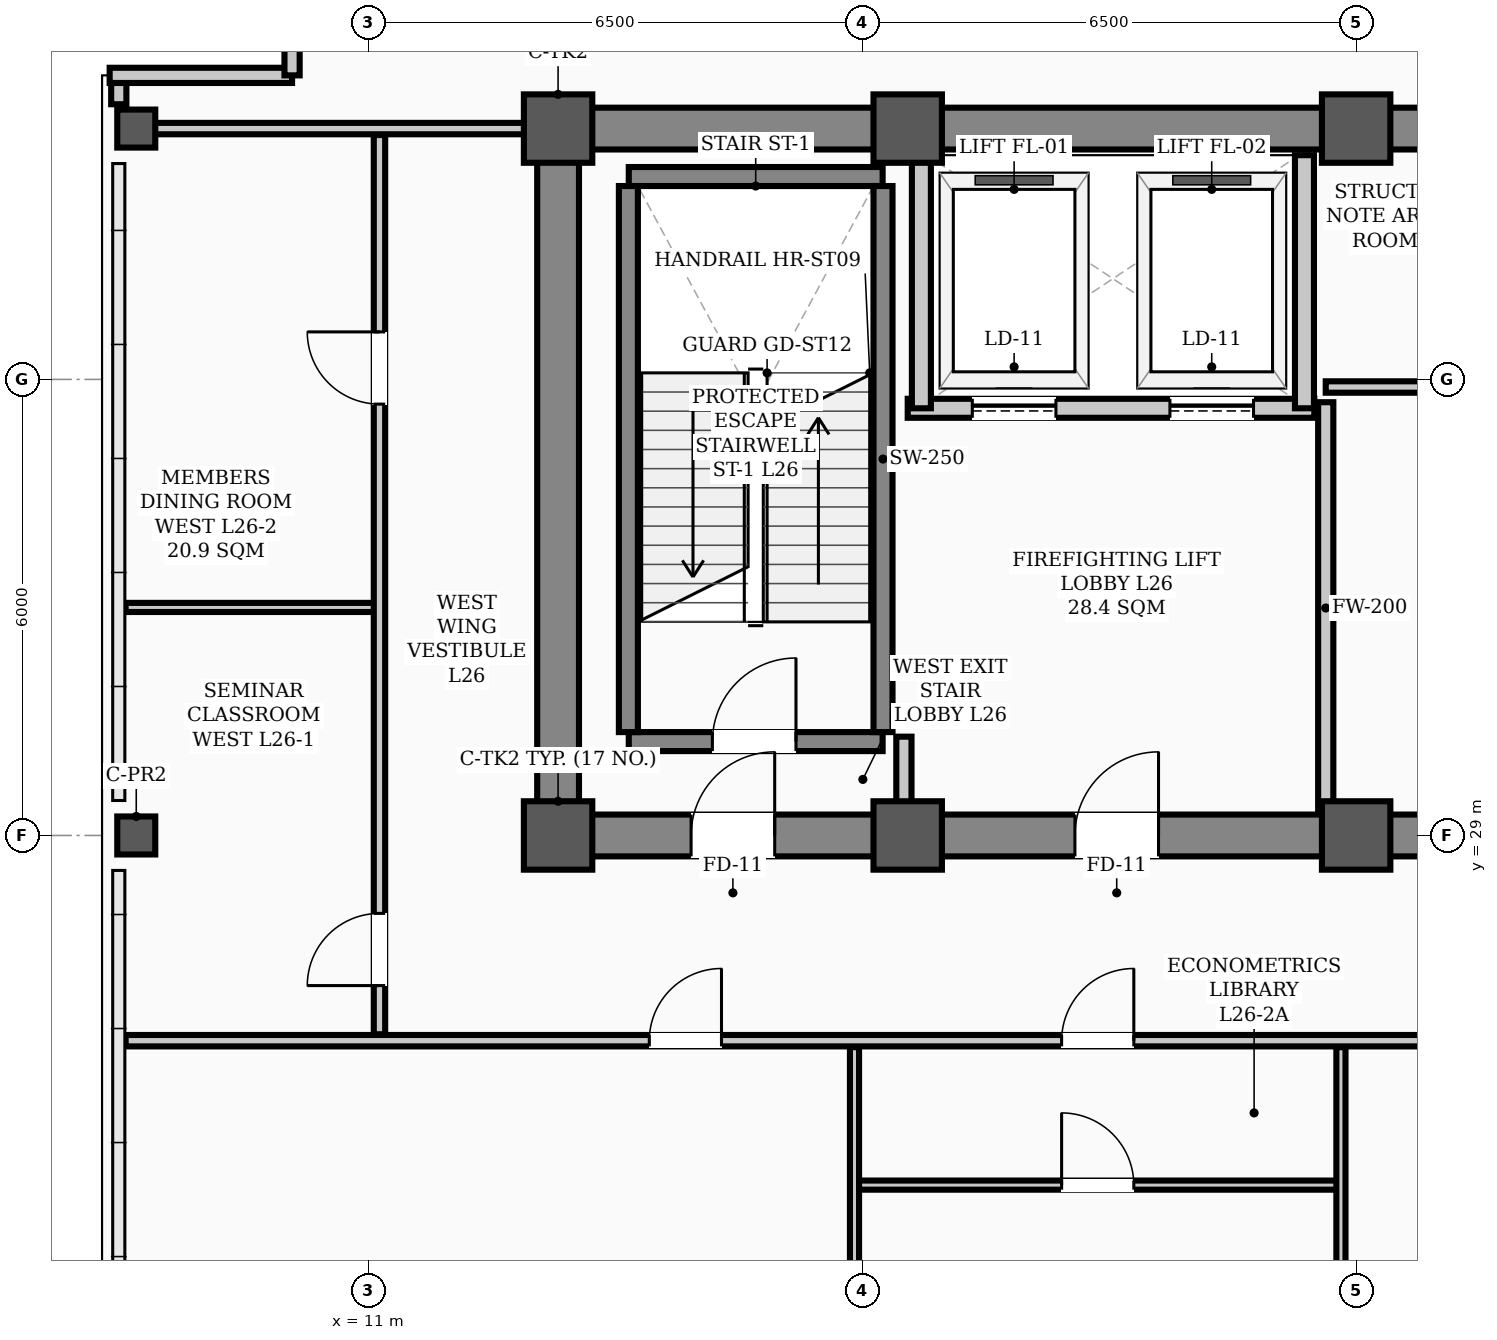
"""IFC4 building model, lengths in metres.
Left out: names, types, materials, properties, quantities, classifications, styles, units other than length and angle.
Written with IfcOpenShell. Run it as: python <this file> out.ifc"""

import sys

from ifc_helpers import new_model, si_unit, direction, frame, frame_2d, origin, origin_2d, place, context, subcontext, project, spatial, rectangle, hollow_rectangle, extrude, element, fill, save


model = new_model("IFC4")
c1 = context("Model", 3, precision=1e-05, world=origin(), true_north=direction((0.0, 1.0)))
c2 = subcontext(c1, "Body", "Model", "MODEL_VIEW")
j1 = project(units=[si_unit("LENGTHUNIT", "METRE"), si_unit("PLANEANGLEUNIT", "RADIAN")], contexts=[c1])
p1 = place(None, origin())
s1 = spatial("IfcSite", under=j1, at=p1, CompositionType="ELEMENT")
p2 = place(p1, origin())
s2 = spatial("IfcBuilding", under=s1, at=p2, CompositionType="ELEMENT")
p3 = place(p2, frame((0.0, 0.0, 106.0)))
s3 = spatial("IfcBuildingStorey", under=s2, at=p3, CompositionType="ELEMENT", Elevation=106.0)
for number, where, z_axis, x_axis in (
    (1, (13.5, 29.0, 0.0), (0.0, 0.0, 1.0), (1.0, 0.0, 0.0)),
    (2, (13.5, 38.3, 0.0), (0.0, 0.0, 1.0), (1.0, 0.0, 0.0)),
    (3, (18.1, 29.0, 0.0), (0.0, 0.0, 1.0), (1.0, 0.0, 0.0)),
    (4, (18.1, 38.3, 0.0), (0.0, 0.0, 1.0), (1.0, 0.0, 0.0)),
    (5, (24.0, 29.0, 0.0), (0.0, 0.0, 1.0), (1.0, 0.0, 0.0)),
    (6, (24.0, 38.3, 0.0), (0.0, 0.0, 1.0), (1.0, 0.0, 0.0)),
):
    element("IfcColumn", number, at=place(p3, frame(where, z_axis=z_axis, x_axis=x_axis)), inside=s3, PredefinedType="COLUMN", context=c2, shape_type="SweptSolid", body=[
        extrude(hollow_rectangle(XDim=0.9, YDim=0.9, WallThickness=0.035, InnerFilletRadius=0.017, OuterFilletRadius=0.052, at=origin_2d()), origin(), (0.0, 0.0, 1.0), 5.0),
    ])
for number, where, z_axis, x_axis in (
    (7, (7.95, 29.0, 0.0), (0.0, 0.0, 1.0), (1.0, 0.0, 0.0)),
    (8, (7.95, 38.3, 0.0), (0.0, 0.0, 1.0), (1.0, 0.0, 0.0)),
):
    element("IfcColumn", number, at=place(p3, frame(where, z_axis=z_axis, x_axis=x_axis)), inside=s3, PredefinedType="COLUMN", context=c2, shape_type="SweptSolid", body=[
        extrude(hollow_rectangle(XDim=0.5, YDim=0.5, WallThickness=0.024, InnerFilletRadius=0.012, OuterFilletRadius=0.036, at=origin_2d()), origin(), (0.0, 0.0, 1.0), 5.0),
    ])
p4 = place(p3, frame((7.72, 38.62, 0.0), z_axis=(0.0, 0.0, 1.0), x_axis=(0.0, 1.0, 0.0)))
e9 = element("IfcWall", 9, at=p4, inside=s3, PredefinedType="PARAPET", context=c2, shape_type="SweptSolid", body=[
    extrude(rectangle(XDim=0.28, YDim=0.2, at=frame_2d((0.14, 0.0))), origin(), (0.0, 0.0, 1.0), 1.2),
])
for number, where, z_axis, x_axis in (
    (10, (7.6, 39.0, 0.0), (0.0, 0.0, 1.0), (1.0, 0.0, 0.0)),
    (11, (10.0, 39.0, 0.0), (0.0, 0.0, 1.0), (0.0, 1.0, 0.0)),
):
    element("IfcWall", number, at=place(p3, frame(where, z_axis=z_axis, x_axis=x_axis)), inside=s3, PredefinedType="PARAPET", context=c2, shape_type="SweptSolid", body=[
        extrude(rectangle(XDim=2.4, YDim=0.2, at=frame_2d((1.2, 0.0))), origin(), (0.0, 0.0, 1.0), 1.2),
    ])
p5 = place(p3, frame((13.5, 29.0, 0.0), z_axis=(0.0, 0.0, 1.0), x_axis=(1.0, 0.0, 0.0)))
e12 = element("IfcWall", 12, at=p5, inside=s3, PredefinedType="SHEAR", context=c2, shape_type="SweptSolid", body=[
    extrude(rectangle(XDim=30.5, YDim=0.55, at=frame_2d((15.25, 0.0))), origin(), (0.0, 0.0, 1.0), 4.82),
])
p6 = place(p5, frame((1.75, 0.0, 0.0)))
e13 = element("IfcOpeningElement", 13, at=p6, cuts=e12, PredefinedType="OPENING", context=c2, shape_type="SweptSolid", body=[
    extrude(rectangle(XDim=1.1, YDim=2.08, at=frame_2d((0.55, 1.04))), frame((0.0, 0.285, 0.0), z_axis=(0.0, -1.0, 0.0), x_axis=(1.0, 0.0, 0.0)), (0.0, 0.0, 1.0), 0.57),
])
p7 = place(p5, frame((26.7, 0.0, 0.0)))
e14 = element("IfcOpeningElement", 14, at=p7, cuts=e12, PredefinedType="OPENING", context=c2, shape_type="SweptSolid", body=[
    extrude(rectangle(XDim=1.1, YDim=2.08, at=frame_2d((0.55, 1.04))), frame((0.0, 0.285, 0.0), z_axis=(0.0, -1.0, 0.0), x_axis=(1.0, 0.0, 0.0)), (0.0, 0.0, 1.0), 0.57),
])
p8 = place(p5, frame((6.8, 0.0, 0.0)))
e15 = element("IfcOpeningElement", 15, at=p8, cuts=e12, PredefinedType="OPENING", context=c2, shape_type="SweptSolid", body=[
    extrude(rectangle(XDim=1.1, YDim=2.08, at=frame_2d((0.55, 1.04))), frame((0.0, 0.285, 0.0), z_axis=(0.0, -1.0, 0.0), x_axis=(1.0, 0.0, 0.0)), (0.0, 0.0, 1.0), 0.57),
])
p9 = place(p5, frame((13.2, 0.0, 0.0)))
e16 = element("IfcOpeningElement", 16, at=p9, cuts=e12, PredefinedType="OPENING", context=c2, shape_type="SweptSolid", body=[
    extrude(rectangle(XDim=1.6, YDim=2.08, at=frame_2d((0.8, 1.04))), frame((0.0, 0.285, 0.0), z_axis=(0.0, -1.0, 0.0), x_axis=(1.0, 0.0, 0.0)), (0.0, 0.0, 1.0), 0.57),
])
p10 = place(p5, frame((20.525, 0.0, 0.0)))
e17 = element("IfcOpeningElement", 17, at=p10, cuts=e12, PredefinedType="OPENING", context=c2, shape_type="SweptSolid", body=[
    extrude(rectangle(XDim=0.95, YDim=2.08, at=frame_2d((0.475, 1.04))), frame((0.0, 0.285, 0.0), z_axis=(0.0, -1.0, 0.0), x_axis=(1.0, 0.0, 0.0)), (0.0, 0.0, 1.0), 0.57),
])
p11 = place(p3, frame((13.5, 38.3, 0.0), z_axis=(0.0, 0.0, 1.0), x_axis=(1.0, 0.0, 0.0)))
e18 = element("IfcWall", 18, at=p11, inside=s3, PredefinedType="SHEAR", context=c2, shape_type="SweptSolid", body=[
    extrude(rectangle(XDim=30.5, YDim=0.55, at=frame_2d((15.25, 0.0))), origin(), (0.0, 0.0, 1.0), 4.82),
])
p12 = place(p3, frame((13.5, 29.35, 0.0), z_axis=(0.0, 0.0, 1.0), x_axis=(0.0, 1.0, 0.0)))
e19 = element("IfcWall", 19, at=p12, inside=s3, PredefinedType="SHEAR", context=c2, shape_type="SweptSolid", body=[
    extrude(rectangle(XDim=8.6, YDim=0.55, at=frame_2d((4.3, 0.0))), origin(), (0.0, 0.0, 1.0), 4.82),
])
p13 = place(p3, frame((14.43, 30.235, 0.0), z_axis=(0.0, 0.0, 1.0), x_axis=(1.0, 0.0, 0.0)))
e20 = element("IfcWall", 20, at=p13, inside=s3, PredefinedType="STANDARD", context=c2, shape_type="SweptSolid", body=[
    extrude(rectangle(XDim=3.34, YDim=0.25, at=frame_2d((1.67, 0.0))), origin(), (0.0, 0.0, 1.0), 4.82),
])
p14 = place(p13, frame((1.1, 0.0, 0.0)))
e21 = element("IfcOpeningElement", 21, at=p14, cuts=e20, PredefinedType="OPENING", context=c2, shape_type="SweptSolid", body=[
    extrude(rectangle(XDim=1.1, YDim=2.08, at=frame_2d((0.55, 1.04))), frame((0.0, 0.135, 0.0), z_axis=(0.0, -1.0, 0.0), x_axis=(1.0, 0.0, 0.0)), (0.0, 0.0, 1.0), 0.27),
])
p15 = place(p3, frame((14.43, 37.669, 0.0), z_axis=(0.0, 0.0, 1.0), x_axis=(1.0, 0.0, 0.0)))
e22 = element("IfcWall", 22, at=p15, inside=s3, PredefinedType="STANDARD", context=c2, shape_type="SweptSolid", body=[
    extrude(rectangle(XDim=3.34, YDim=0.25, at=frame_2d((1.67, 0.0))), origin(), (0.0, 0.0, 1.0), 4.82),
])
for number, where, z_axis, x_axis in (
    (23, (14.425, 30.36, 0.0), (0.0, 0.0, 1.0), (0.0, 1.0, 0.0)),
    (24, (17.775, 30.36, 0.0), (0.0, 0.0, 1.0), (0.0, 1.0, 0.0)),
):
    element("IfcWall", number, at=place(p3, frame(where, z_axis=z_axis, x_axis=x_axis)), inside=s3, PredefinedType="STANDARD", context=c2, shape_type="SweptSolid", body=[
        extrude(rectangle(XDim=7.184, YDim=0.25, at=frame_2d((3.592, 0.0))), origin(), (0.0, 0.0, 1.0), 4.82),
    ])
p16 = place(p3, frame((18.1, 34.62, 0.0), z_axis=(0.0, 0.0, 1.0), x_axis=(1.0, 0.0, 0.0)))
e25 = element("IfcWall", 25, at=p16, inside=s3, PredefinedType="STANDARD", context=c2, shape_type="SweptSolid", body=[
    extrude(rectangle(XDim=5.35, YDim=0.25, at=frame_2d((2.675, 0.0))), origin(), (0.0, 0.0, 1.0), 4.82),
])
p17 = place(p16, frame((0.85, 0.0, 0.0)))
e26 = element("IfcOpeningElement", 26, at=p17, cuts=e25, PredefinedType="OPENING", context=c2, shape_type="SweptSolid", body=[
    extrude(rectangle(XDim=1.1, YDim=2.08, at=frame_2d((0.55, 1.04))), frame((0.0, 0.135, 0.0), z_axis=(0.0, -1.0, 0.0), x_axis=(1.0, 0.0, 0.0)), (0.0, 0.0, 1.0), 0.27),
])
p18 = place(p16, frame((3.45, 0.0, 0.0)))
e27 = element("IfcOpeningElement", 27, at=p18, cuts=e25, PredefinedType="OPENING", context=c2, shape_type="SweptSolid", body=[
    extrude(rectangle(XDim=1.1, YDim=2.08, at=frame_2d((0.55, 1.04))), frame((0.0, 0.135, 0.0), z_axis=(0.0, -1.0, 0.0), x_axis=(1.0, 0.0, 0.0)), (0.0, 0.0, 1.0), 0.27),
])
for number, where, z_axis, x_axis in (
    (28, (18.28, 34.62, 0.0), (0.0, 0.0, 1.0), (0.0, 1.0, 0.0)),
    (29, (23.32, 34.62, 0.0), (0.0, 0.0, 1.0), (0.0, 1.0, 0.0)),
):
    element("IfcWall", number, at=place(p3, frame(where, z_axis=z_axis, x_axis=x_axis)), inside=s3, PredefinedType="STANDARD", context=c2, shape_type="SweptSolid", body=[
        extrude(rectangle(XDim=3.33, YDim=0.25, at=frame_2d((1.665, 0.0))), origin(), (0.0, 0.0, 1.0), 4.4),
    ])
p19 = place(p3, frame((23.6, 34.9, 0.0), z_axis=(0.0, 0.0, 1.0), x_axis=(1.0, 0.0, 0.0)))
e30 = element("IfcWall", 30, at=p19, inside=s3, PredefinedType="PARTITIONING", context=c2, shape_type="SweptSolid", body=[
    extrude(rectangle(XDim=4.58, YDim=0.15, at=frame_2d((2.29, 0.0))), origin(), (0.0, 0.0, 1.0), 4.82),
])
p20 = place(p19, frame((1.875, 0.0, 0.0)))
e31 = element("IfcOpeningElement", 31, at=p20, cuts=e30, PredefinedType="OPENING", context=c2, shape_type="SweptSolid", body=[
    extrude(rectangle(XDim=0.95, YDim=2.08, at=frame_2d((0.475, 1.04))), frame((0.0, 0.085, 0.0), z_axis=(0.0, -1.0, 0.0), x_axis=(1.0, 0.0, 0.0)), (0.0, 0.0, 1.0), 0.17),
])
p21 = place(p3, frame((7.81, 26.3, 0.0), z_axis=(0.0, 0.0, 1.0), x_axis=(1.0, 0.0, 0.0)))
e32 = element("IfcWall", 32, at=p21, inside=s3, PredefinedType="PARTITIONING", context=c2, shape_type="SweptSolid", body=[
    extrude(rectangle(XDim=49.38, YDim=0.15, at=frame_2d((24.69, 0.0))), origin(), (0.0, 0.0, 1.0), 4.2),
])
p22 = place(p21, frame((6.89, 0.0, 0.0)))
e33 = element("IfcOpeningElement", 33, at=p22, cuts=e32, PredefinedType="OPENING", context=c2, shape_type="SweptSolid", body=[
    extrude(rectangle(XDim=0.95, YDim=2.08, at=frame_2d((0.475, 1.04))), frame((0.0, 0.085, 0.0), z_axis=(0.0, -1.0, 0.0), x_axis=(1.0, 0.0, 0.0)), (0.0, 0.0, 1.0), 0.17),
])
p23 = place(p21, frame((12.315, 0.0, 0.0)))
e34 = element("IfcOpeningElement", 34, at=p23, cuts=e32, PredefinedType="OPENING", context=c2, shape_type="SweptSolid", body=[
    extrude(rectangle(XDim=0.95, YDim=2.08, at=frame_2d((0.475, 1.04))), frame((0.0, 0.085, 0.0), z_axis=(0.0, -1.0, 0.0), x_axis=(1.0, 0.0, 0.0)), (0.0, 0.0, 1.0), 0.17),
])
p24 = place(p21, frame((18.815, 0.0, 0.0)))
e35 = element("IfcOpeningElement", 35, at=p24, cuts=e32, PredefinedType="OPENING", context=c2, shape_type="SweptSolid", body=[
    extrude(rectangle(XDim=0.95, YDim=2.08, at=frame_2d((0.475, 1.04))), frame((0.0, 0.085, 0.0), z_axis=(0.0, -1.0, 0.0), x_axis=(1.0, 0.0, 0.0)), (0.0, 0.0, 1.0), 0.17),
])
p25 = place(p21, frame((25.415, 0.0, 0.0)))
e36 = element("IfcOpeningElement", 36, at=p25, cuts=e32, PredefinedType="OPENING", context=c2, shape_type="SweptSolid", body=[
    extrude(rectangle(XDim=0.95, YDim=2.08, at=frame_2d((0.475, 1.04))), frame((0.0, 0.085, 0.0), z_axis=(0.0, -1.0, 0.0), x_axis=(1.0, 0.0, 0.0)), (0.0, 0.0, 1.0), 0.17),
])
p26 = place(p21, frame((31.915, 0.0, 0.0)))
e37 = element("IfcOpeningElement", 37, at=p26, cuts=e32, PredefinedType="OPENING", context=c2, shape_type="SweptSolid", body=[
    extrude(rectangle(XDim=0.95, YDim=2.08, at=frame_2d((0.475, 1.04))), frame((0.0, 0.085, 0.0), z_axis=(0.0, -1.0, 0.0), x_axis=(1.0, 0.0, 0.0)), (0.0, 0.0, 1.0), 0.17),
])
p27 = place(p21, frame((36.59, 0.0, 0.0)))
e38 = element("IfcOpeningElement", 38, at=p27, cuts=e32, PredefinedType="OPENING", context=c2, shape_type="SweptSolid", body=[
    extrude(rectangle(XDim=0.95, YDim=2.08, at=frame_2d((0.475, 1.04))), frame((0.0, 0.085, 0.0), z_axis=(0.0, -1.0, 0.0), x_axis=(1.0, 0.0, 0.0)), (0.0, 0.0, 1.0), 0.17),
])
p28 = place(p3, frame((7.81, 38.3, 0.0), z_axis=(0.0, 0.0, 1.0), x_axis=(1.0, 0.0, 0.0)))
e39 = element("IfcWall", 39, at=p28, inside=s3, PredefinedType="PARTITIONING", context=c2, shape_type="SweptSolid", body=[
    extrude(rectangle(XDim=5.69, YDim=0.15, at=frame_2d((2.845, 0.0))), origin(), (0.0, 0.0, 1.0), 4.1),
])
p29 = place(p3, frame((17.4, 24.4, 0.0), z_axis=(0.0, 0.0, 1.0), x_axis=(1.0, 0.0, 0.0)))
e40 = element("IfcWall", 40, at=p29, inside=s3, PredefinedType="PARTITIONING", context=c2, shape_type="SweptSolid", body=[
    extrude(rectangle(XDim=6.4, YDim=0.12, at=frame_2d((3.2, 0.0))), origin(), (0.0, 0.0, 1.0), 4.2),
])
p30 = place(p29, frame((2.725, 0.0, 0.0)))
e41 = element("IfcOpeningElement", 41, at=p30, cuts=e40, PredefinedType="OPENING", context=c2, shape_type="SweptSolid", body=[
    extrude(rectangle(XDim=0.95, YDim=2.08, at=frame_2d((0.475, 1.04))), frame((0.0, 0.07, 0.0), z_axis=(0.0, -1.0, 0.0), x_axis=(1.0, 0.0, 0.0)), (0.0, 0.0, 1.0), 0.14),
])
p31 = place(p3, frame((7.81, 32.0, 0.0), z_axis=(0.0, 0.0, 1.0), x_axis=(1.0, 0.0, 0.0)))
e42 = element("IfcWall", 42, at=p31, inside=s3, PredefinedType="PARTITIONING", context=c2, shape_type="SweptSolid", body=[
    extrude(rectangle(XDim=3.34, YDim=0.12, at=frame_2d((1.67, 0.0))), origin(), (0.0, 0.0, 1.0), 4.312),
])
p32 = place(p3, frame((18.05, 29.285, 0.0), z_axis=(0.0, 0.0, 1.0), x_axis=(0.0, 1.0, 0.0)))
e43 = element("IfcWall", 43, at=p32, inside=s3, PredefinedType="STANDARD", context=c2, shape_type="SweptSolid", body=[
    extrude(rectangle(XDim=1.015, YDim=0.2, at=frame_2d((0.508, 0.0))), origin(), (0.0, 0.0, 1.0), 4.4),
])
p33 = place(p3, frame((23.6, 29.285, 0.0), z_axis=(0.0, 0.0, 1.0), x_axis=(0.0, 1.0, 0.0)))
e44 = element("IfcWall", 44, at=p33, inside=s3, PredefinedType="STANDARD", context=c2, shape_type="SweptSolid", body=[
    extrude(rectangle(XDim=5.415, YDim=0.2, at=frame_2d((2.708, 0.0))), origin(), (0.0, 0.0, 1.0), 4.2),
])
p34 = place(p3, frame((11.15, 26.385, 0.0), z_axis=(0.0, 0.0, 1.0), x_axis=(0.0, 1.0, 0.0)))
e45 = element("IfcWall", 45, at=p34, inside=s3, PredefinedType="PARTITIONING", context=c2, shape_type="SweptSolid", body=[
    extrude(rectangle(XDim=11.83, YDim=0.15, at=frame_2d((5.915, 0.0))), origin(), (0.0, 0.0, 1.0), 4.1),
])
p35 = place(p34, frame((0.64, 0.0, 0.0)))
e46 = element("IfcOpeningElement", 46, at=p35, cuts=e45, PredefinedType="OPENING", context=c2, shape_type="SweptSolid", body=[
    extrude(rectangle(XDim=0.95, YDim=2.08, at=frame_2d((0.475, 1.04))), frame((0.0, 0.085, 0.0), z_axis=(0.0, -1.0, 0.0), x_axis=(1.0, 0.0, 0.0)), (0.0, 0.0, 1.0), 0.17),
])
p36 = place(p34, frame((8.29, 0.0, 0.0)))
e47 = element("IfcOpeningElement", 47, at=p36, cuts=e45, PredefinedType="OPENING", context=c2, shape_type="SweptSolid", body=[
    extrude(rectangle(XDim=0.95, YDim=2.08, at=frame_2d((0.475, 1.04))), frame((0.0, 0.085, 0.0), z_axis=(0.0, -1.0, 0.0), x_axis=(1.0, 0.0, 0.0)), (0.0, 0.0, 1.0), 0.17),
])
p37 = place(p3, frame((17.4, 9.81, 0.0), z_axis=(0.0, 0.0, 1.0), x_axis=(0.0, 1.0, 0.0)))
e48 = element("IfcWall", 48, at=p37, inside=s3, PredefinedType="PARTITIONING", context=c2, shape_type="SweptSolid", body=[
    extrude(rectangle(XDim=16.405, YDim=0.12, at=frame_2d((8.203, 0.0))), origin(), (0.0, 0.0, 1.0), 4.1),
])
p38 = place(p3, frame((23.8, 11.57, 0.0), z_axis=(0.0, 0.0, 1.0), x_axis=(0.0, 1.0, 0.0)))
e49 = element("IfcWall", 49, at=p38, inside=s3, PredefinedType="PARTITIONING", context=c2, shape_type="SweptSolid", body=[
    extrude(rectangle(XDim=14.645, YDim=0.12, at=frame_2d((7.323, 0.0))), origin(), (0.0, 0.0, 1.0), 4.1),
])
p39 = place(p14, origin())
e50 = element("IfcDoor", 50, at=p39, inside=s3, OperationType="SINGLE_SWING_RIGHT", PredefinedType="DOOR", context=c2, shape_type="SweptSolid", body=[
    extrude(rectangle(XDim=1.1, YDim=2.08, at=frame_2d((0.55, 1.04))), frame((0.0, 0.025, 0.0), z_axis=(0.0, -1.0, 0.0), x_axis=(1.0, 0.0, 0.0)), (0.0, 0.0, 1.0), 0.05),
])
fill(e21, e50)
p40 = place(p6, origin())
e51 = element("IfcDoor", 51, at=p40, inside=s3, OperationType="SINGLE_SWING_RIGHT", PredefinedType="DOOR", context=c2, shape_type="SweptSolid", body=[
    extrude(rectangle(XDim=1.1, YDim=2.08, at=frame_2d((0.55, 1.04))), frame((0.0, 0.025, 0.0), z_axis=(0.0, -1.0, 0.0), x_axis=(1.0, 0.0, 0.0)), (0.0, 0.0, 1.0), 0.05),
])
fill(e13, e51)
p41 = place(p8, origin())
e52 = element("IfcDoor", 52, at=p41, inside=s3, OperationType="SINGLE_SWING_RIGHT", PredefinedType="DOOR", context=c2, shape_type="SweptSolid", body=[
    extrude(rectangle(XDim=1.1, YDim=2.08, at=frame_2d((0.55, 1.04))), frame((0.0, 0.025, 0.0), z_axis=(0.0, -1.0, 0.0), x_axis=(1.0, 0.0, 0.0)), (0.0, 0.0, 1.0), 0.05),
])
fill(e15, e52)
p42 = place(p22, origin())
e53 = element("IfcDoor", 53, at=p42, inside=s3, OperationType="SINGLE_SWING_RIGHT", PredefinedType="DOOR", context=c2, shape_type="SweptSolid", body=[
    extrude(rectangle(XDim=0.95, YDim=2.08, at=frame_2d((0.475, 1.04))), frame((0.0, 0.025, 0.0), z_axis=(0.0, -1.0, 0.0), x_axis=(1.0, 0.0, 0.0)), (0.0, 0.0, 1.0), 0.05),
])
fill(e33, e53)
p43 = place(p30, origin())
e54 = element("IfcDoor", 54, at=p43, inside=s3, OperationType="SINGLE_SWING_LEFT", PredefinedType="DOOR", context=c2, shape_type="SweptSolid", body=[
    extrude(rectangle(XDim=0.95, YDim=2.08, at=frame_2d((0.475, 1.04))), frame((0.0, 0.025, 0.0), z_axis=(0.0, -1.0, 0.0), x_axis=(1.0, 0.0, 0.0)), (0.0, 0.0, 1.0), 0.05),
])
fill(e41, e54)
p44 = place(p23, origin())
e55 = element("IfcDoor", 55, at=p44, inside=s3, OperationType="SINGLE_SWING_RIGHT", PredefinedType="DOOR", context=c2, shape_type="SweptSolid", body=[
    extrude(rectangle(XDim=0.95, YDim=2.08, at=frame_2d((0.475, 1.04))), frame((0.0, 0.025, 0.0), z_axis=(0.0, -1.0, 0.0), x_axis=(1.0, 0.0, 0.0)), (0.0, 0.0, 1.0), 0.05),
])
fill(e34, e55)
p45 = place(p35, origin())
e56 = element("IfcDoor", 56, at=p45, inside=s3, OperationType="SINGLE_SWING_LEFT", PredefinedType="DOOR", context=c2, shape_type="SweptSolid", body=[
    extrude(rectangle(XDim=0.95, YDim=2.08, at=frame_2d((0.475, 1.04))), frame((0.0, 0.025, 0.0), z_axis=(0.0, -1.0, 0.0), x_axis=(1.0, 0.0, 0.0)), (0.0, 0.0, 1.0), 0.05),
])
fill(e46, e56)
p46 = place(p36, origin())
e57 = element("IfcDoor", 57, at=p46, inside=s3, OperationType="SINGLE_SWING_RIGHT", PredefinedType="DOOR", context=c2, shape_type="SweptSolid", body=[
    extrude(rectangle(XDim=0.95, YDim=2.08, at=frame_2d((0.475, 1.04))), frame((0.0, 0.025, 0.0), z_axis=(0.0, -1.0, 0.0), x_axis=(1.0, 0.0, 0.0)), (0.0, 0.0, 1.0), 0.05),
])
fill(e47, e57)
p47 = place(p17, origin())
e58 = element("IfcDoor", 58, at=p47, inside=s3, OperationType="SLIDING_TO_LEFT", PredefinedType="DOOR", context=c2, shape_type="SweptSolid", body=[
    extrude(rectangle(XDim=1.1, YDim=2.08, at=frame_2d((0.55, 1.04))), frame((0.0, 0.025, 0.0), z_axis=(0.0, -1.0, 0.0), x_axis=(1.0, 0.0, 0.0)), (0.0, 0.0, 1.0), 0.05),
])
fill(e26, e58)
p48 = place(p18, origin())
e59 = element("IfcDoor", 59, at=p48, inside=s3, OperationType="SLIDING_TO_LEFT", PredefinedType="DOOR", context=c2, shape_type="SweptSolid", body=[
    extrude(rectangle(XDim=1.1, YDim=2.08, at=frame_2d((0.55, 1.04))), frame((0.0, 0.025, 0.0), z_axis=(0.0, -1.0, 0.0), x_axis=(1.0, 0.0, 0.0)), (0.0, 0.0, 1.0), 0.05),
])
fill(e27, e59)
save(model, sys.argv[1])
